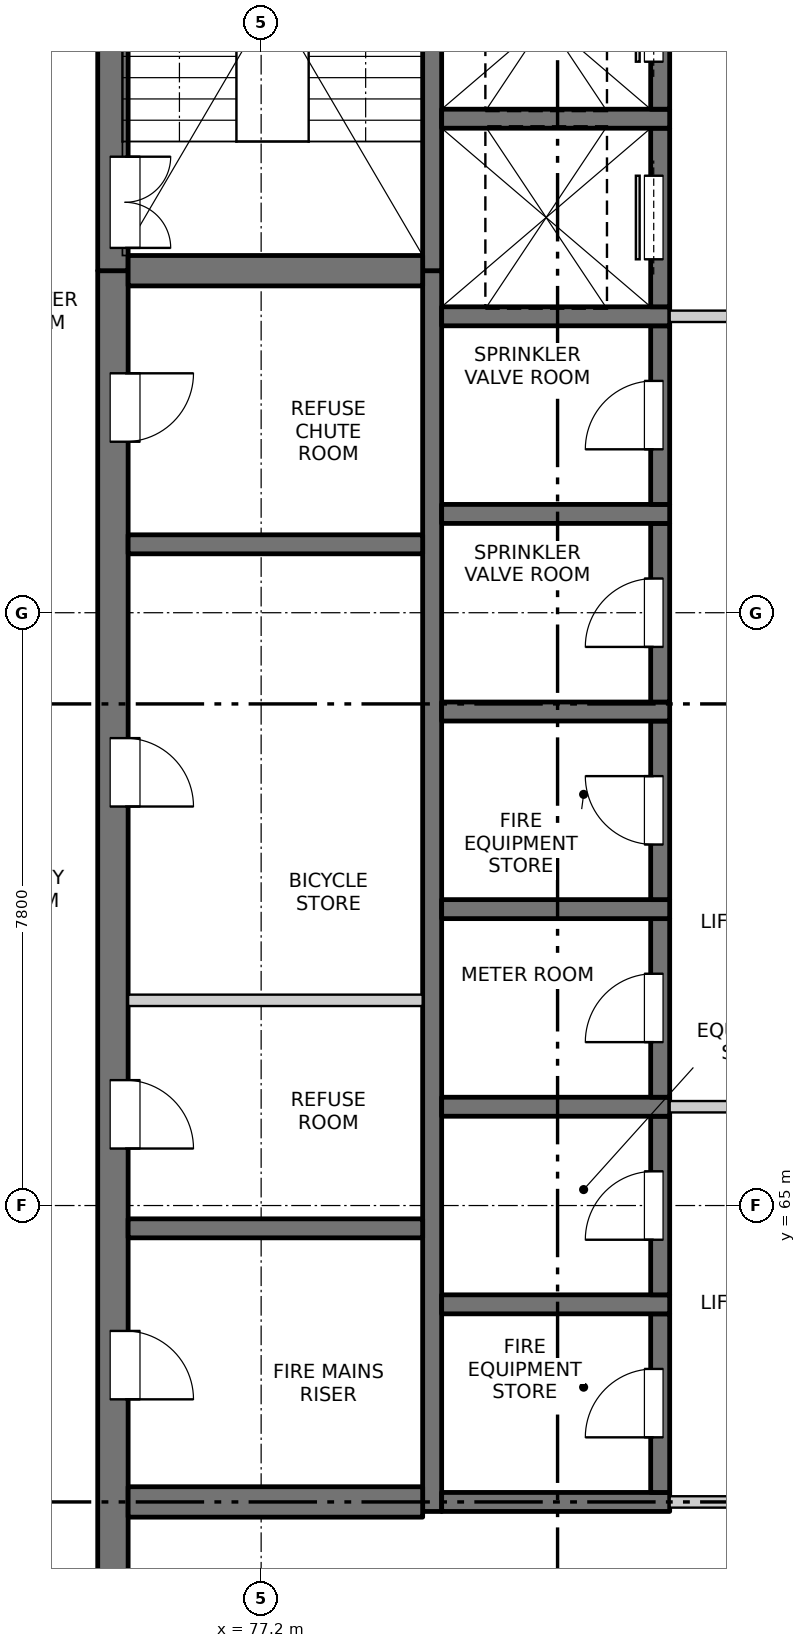
"""IFC4 building model, lengths in metres.
Left out: names, types, materials, properties, quantities, classifications, styles, units other than length and angle.
Written with IfcOpenShell. Run it as: python <this file> out.ifc"""

import sys

from ifc_helpers import new_model, si_unit, direction, frame, frame_2d, origin, place, context, subcontext, project, spatial, rectangle, extrude, element, fill, save


model = new_model("IFC4")
c1 = context("Model", 3, precision=1e-05, world=origin(), true_north=direction((0.0, 1.0)))
c2 = subcontext(c1, "Body", "Model", "MODEL_VIEW")
j1 = project(units=[si_unit("LENGTHUNIT", "METRE"), si_unit("PLANEANGLEUNIT", "RADIAN")], contexts=[c1])
p1 = place(None, origin())
s1 = spatial("IfcSite", under=j1, at=p1, CompositionType="ELEMENT")
p2 = place(p1, origin())
s2 = spatial("IfcBuilding", under=s1, at=p2, CompositionType="ELEMENT")
p3 = place(p2, frame((0.0, 0.0, 259.6)))
s3 = spatial("IfcBuildingStorey", under=s2, at=p3, CompositionType="ELEMENT", Elevation=259.6)
p4 = place(p3, frame((75.25, 55.05, -0.25), z_axis=(0.0, 0.0, 1.0), x_axis=(0.0, 1.0, 0.0)))
e1 = element("IfcWall", 1, at=p4, inside=s3, PredefinedType="SOLIDWALL", context=c2, shape_type="SweptSolid", body=[
    extrude(rectangle(XDim=22.25, YDim=0.4, at=frame_2d((11.125, 0.0))), origin(), (0.0, 0.0, 1.0), 3.4),
])
p5 = place(p4, frame((7.4, 0.0, 0.25)))
e2 = element("IfcOpeningElement", 2, at=p5, cuts=e1, PredefinedType="OPENING", context=c2, shape_type="SweptSolid", body=[
    extrude(rectangle(XDim=0.9, YDim=2.1, at=frame_2d((0.45, 1.05))), frame((0.0, 0.21, 0.0), z_axis=(0.0, -1.0, 0.0), x_axis=(1.0, 0.0, 0.0)), (0.0, 0.0, 1.0), 0.42),
])
p6 = place(p4, frame((10.7, 0.0, 0.25)))
e3 = element("IfcOpeningElement", 3, at=p6, cuts=e1, PredefinedType="OPENING", context=c2, shape_type="SweptSolid", body=[
    extrude(rectangle(XDim=0.9, YDim=2.1, at=frame_2d((0.45, 1.05))), frame((0.0, 0.21, 0.0), z_axis=(0.0, -1.0, 0.0), x_axis=(1.0, 0.0, 0.0)), (0.0, 0.0, 1.0), 0.42),
])
p7 = place(p4, frame((15.2, 0.0, 0.25)))
e4 = element("IfcOpeningElement", 4, at=p7, cuts=e1, PredefinedType="OPENING", context=c2, shape_type="SweptSolid", body=[
    extrude(rectangle(XDim=0.9, YDim=2.1, at=frame_2d((0.45, 1.05))), frame((0.0, 0.21, 0.0), z_axis=(0.0, -1.0, 0.0), x_axis=(1.0, 0.0, 0.0)), (0.0, 0.0, 1.0), 0.42),
])
p8 = place(p4, frame((20.0, 0.0, 0.25)))
e5 = element("IfcOpeningElement", 5, at=p8, cuts=e1, PredefinedType="OPENING", context=c2, shape_type="SweptSolid", body=[
    extrude(rectangle(XDim=0.9, YDim=2.1, at=frame_2d((0.45, 1.05))), frame((0.0, 0.21, 0.0), z_axis=(0.0, -1.0, 0.0), x_axis=(1.0, 0.0, 0.0)), (0.0, 0.0, 1.0), 0.42),
])
p9 = place(p3, frame((75.25, 77.3, -0.25), z_axis=(0.0, 0.0, 1.0), x_axis=(0.0, 1.0, 0.0)))
e6 = element("IfcWall", 6, at=p9, inside=s3, PredefinedType="SOLIDWALL", context=c2, shape_type="SweptSolid", body=[
    extrude(rectangle(XDim=7.4, YDim=0.4, at=frame_2d((3.7, 0.0))), origin(), (0.0, 0.0, 1.0), 3.4),
])
p10 = place(p9, frame((0.3, 0.0, 0.25)))
e7 = element("IfcOpeningElement", 7, at=p10, cuts=e6, PredefinedType="OPENING", context=c2, shape_type="SweptSolid", body=[
    extrude(rectangle(XDim=1.2, YDim=2.1, at=frame_2d((0.6, 1.05))), frame((0.0, 0.21, 0.0), z_axis=(0.0, -1.0, 0.0), x_axis=(1.0, 0.0, 0.0)), (0.0, 0.0, 1.0), 0.42),
])
p11 = place(p3, frame((79.45, 60.975, -0.25), z_axis=(0.0, 0.0, 1.0), x_axis=(0.0, 1.0, 0.0)))
e8 = element("IfcWall", 8, at=p11, inside=s3, PredefinedType="SOLIDWALL", context=c2, shape_type="SweptSolid", body=[
    extrude(rectangle(XDim=16.325, YDim=0.25, at=frame_2d((8.163, 0.0))), origin(), (0.0, 0.0, 1.0), 3.4),
])
p12 = place(p3, frame((79.45, 77.3, -0.25), z_axis=(0.0, 0.0, 1.0), x_axis=(0.0, 1.0, 0.0)))
e9 = element("IfcWall", 9, at=p12, inside=s3, PredefinedType="SOLIDWALL", context=c2, shape_type="SweptSolid", body=[
    extrude(rectangle(XDim=7.0, YDim=0.25, at=frame_2d((3.5, 0.0))), origin(), (0.0, 0.0, 1.0), 3.4),
])
p13 = place(p3, frame((79.575, 61.1, -0.25), z_axis=(0.0, 0.0, 1.0), x_axis=(1.0, 0.0, 0.0)))
e10 = element("IfcWall", 10, at=p13, inside=s3, PredefinedType="SOLIDWALL", context=c2, shape_type="SweptSolid", body=[
    extrude(rectangle(XDim=3.0, YDim=0.25, at=frame_2d((1.5, 0.0))), origin(), (0.0, 0.0, 1.0), 3.4),
])
p14 = place(p3, frame((82.45, 61.225, -0.25), z_axis=(0.0, 0.0, 1.0), x_axis=(0.0, 1.0, 0.0)))
e11 = element("IfcWall", 11, at=p14, inside=s3, PredefinedType="SOLIDWALL", context=c2, shape_type="SweptSolid", body=[
    extrude(rectangle(XDim=2.35, YDim=0.25, at=frame_2d((1.175, 0.0))), origin(), (0.0, 0.0, 1.0), 3.4),
])
p15 = place(p14, frame((0.725, 0.0, 0.25)))
e12 = element("IfcOpeningElement", 12, at=p15, cuts=e11, PredefinedType="OPENING", context=c2, shape_type="SweptSolid", body=[
    extrude(rectangle(XDim=0.9, YDim=2.1, at=frame_2d((0.45, 1.05))), frame((0.0, 0.135, 0.0), z_axis=(0.0, -1.0, 0.0), x_axis=(1.0, 0.0, 0.0)), (0.0, 0.0, 1.0), 0.27),
])
p16 = place(p3, frame((79.575, 63.7, -0.25), z_axis=(0.0, 0.0, 1.0), x_axis=(1.0, 0.0, 0.0)))
e13 = element("IfcWall", 13, at=p16, inside=s3, PredefinedType="SOLIDWALL", context=c2, shape_type="SweptSolid", body=[
    extrude(rectangle(XDim=3.0, YDim=0.25, at=frame_2d((1.5, 0.0))), origin(), (0.0, 0.0, 1.0), 3.4),
])
p17 = place(p3, frame((82.45, 63.825, -0.25), z_axis=(0.0, 0.0, 1.0), x_axis=(0.0, 1.0, 0.0)))
e14 = element("IfcWall", 14, at=p17, inside=s3, PredefinedType="SOLIDWALL", context=c2, shape_type="SweptSolid", body=[
    extrude(rectangle(XDim=2.35, YDim=0.25, at=frame_2d((1.175, 0.0))), origin(), (0.0, 0.0, 1.0), 3.4),
])
p18 = place(p17, frame((0.725, 0.0, 0.25)))
e15 = element("IfcOpeningElement", 15, at=p18, cuts=e14, PredefinedType="OPENING", context=c2, shape_type="SweptSolid", body=[
    extrude(rectangle(XDim=0.9, YDim=2.1, at=frame_2d((0.45, 1.05))), frame((0.0, 0.135, 0.0), z_axis=(0.0, -1.0, 0.0), x_axis=(1.0, 0.0, 0.0)), (0.0, 0.0, 1.0), 0.27),
])
p19 = place(p3, frame((79.575, 66.3, -0.25), z_axis=(0.0, 0.0, 1.0), x_axis=(1.0, 0.0, 0.0)))
e16 = element("IfcWall", 16, at=p19, inside=s3, PredefinedType="SOLIDWALL", context=c2, shape_type="SweptSolid", body=[
    extrude(rectangle(XDim=3.0, YDim=0.25, at=frame_2d((1.5, 0.0))), origin(), (0.0, 0.0, 1.0), 3.4),
])
p20 = place(p3, frame((82.45, 66.425, -0.25), z_axis=(0.0, 0.0, 1.0), x_axis=(0.0, 1.0, 0.0)))
e17 = element("IfcWall", 17, at=p20, inside=s3, PredefinedType="SOLIDWALL", context=c2, shape_type="SweptSolid", body=[
    extrude(rectangle(XDim=2.35, YDim=0.25, at=frame_2d((1.175, 0.0))), origin(), (0.0, 0.0, 1.0), 3.4),
])
p21 = place(p20, frame((0.725, 0.0, 0.25)))
e18 = element("IfcOpeningElement", 18, at=p21, cuts=e17, PredefinedType="OPENING", context=c2, shape_type="SweptSolid", body=[
    extrude(rectangle(XDim=0.9, YDim=2.1, at=frame_2d((0.45, 1.05))), frame((0.0, 0.135, 0.0), z_axis=(0.0, -1.0, 0.0), x_axis=(1.0, 0.0, 0.0)), (0.0, 0.0, 1.0), 0.27),
])
p22 = place(p3, frame((79.575, 68.9, -0.25), z_axis=(0.0, 0.0, 1.0), x_axis=(1.0, 0.0, 0.0)))
e19 = element("IfcWall", 19, at=p22, inside=s3, PredefinedType="SOLIDWALL", context=c2, shape_type="SweptSolid", body=[
    extrude(rectangle(XDim=3.0, YDim=0.25, at=frame_2d((1.5, 0.0))), origin(), (0.0, 0.0, 1.0), 3.4),
])
p23 = place(p3, frame((82.45, 69.025, -0.25), z_axis=(0.0, 0.0, 1.0), x_axis=(0.0, 1.0, 0.0)))
e20 = element("IfcWall", 20, at=p23, inside=s3, PredefinedType="SOLIDWALL", context=c2, shape_type="SweptSolid", body=[
    extrude(rectangle(XDim=2.35, YDim=0.25, at=frame_2d((1.175, 0.0))), origin(), (0.0, 0.0, 1.0), 3.4),
])
p24 = place(p23, frame((0.725, 0.0, 0.25)))
e21 = element("IfcOpeningElement", 21, at=p24, cuts=e20, PredefinedType="OPENING", context=c2, shape_type="SweptSolid", body=[
    extrude(rectangle(XDim=0.9, YDim=2.1, at=frame_2d((0.45, 1.05))), frame((0.0, 0.135, 0.0), z_axis=(0.0, -1.0, 0.0), x_axis=(1.0, 0.0, 0.0)), (0.0, 0.0, 1.0), 0.27),
])
p25 = place(p3, frame((79.575, 71.5, -0.25), z_axis=(0.0, 0.0, 1.0), x_axis=(1.0, 0.0, 0.0)))
e22 = element("IfcWall", 22, at=p25, inside=s3, PredefinedType="SOLIDWALL", context=c2, shape_type="SweptSolid", body=[
    extrude(rectangle(XDim=3.0, YDim=0.25, at=frame_2d((1.5, 0.0))), origin(), (0.0, 0.0, 1.0), 3.4),
])
p26 = place(p3, frame((82.45, 71.625, -0.25), z_axis=(0.0, 0.0, 1.0), x_axis=(0.0, 1.0, 0.0)))
e23 = element("IfcWall", 23, at=p26, inside=s3, PredefinedType="SOLIDWALL", context=c2, shape_type="SweptSolid", body=[
    extrude(rectangle(XDim=2.35, YDim=0.25, at=frame_2d((1.175, 0.0))), origin(), (0.0, 0.0, 1.0), 3.4),
])
p27 = place(p26, frame((0.725, 0.0, 0.25)))
e24 = element("IfcOpeningElement", 24, at=p27, cuts=e23, PredefinedType="OPENING", context=c2, shape_type="SweptSolid", body=[
    extrude(rectangle(XDim=0.9, YDim=2.1, at=frame_2d((0.45, 1.05))), frame((0.0, 0.135, 0.0), z_axis=(0.0, -1.0, 0.0), x_axis=(1.0, 0.0, 0.0)), (0.0, 0.0, 1.0), 0.27),
])
p28 = place(p3, frame((79.575, 74.1, -0.25), z_axis=(0.0, 0.0, 1.0), x_axis=(1.0, 0.0, 0.0)))
e25 = element("IfcWall", 25, at=p28, inside=s3, PredefinedType="SOLIDWALL", context=c2, shape_type="SweptSolid", body=[
    extrude(rectangle(XDim=3.0, YDim=0.25, at=frame_2d((1.5, 0.0))), origin(), (0.0, 0.0, 1.0), 3.4),
])
p29 = place(p3, frame((82.45, 74.225, -0.25), z_axis=(0.0, 0.0, 1.0), x_axis=(0.0, 1.0, 0.0)))
e26 = element("IfcWall", 26, at=p29, inside=s3, PredefinedType="SOLIDWALL", context=c2, shape_type="SweptSolid", body=[
    extrude(rectangle(XDim=2.35, YDim=0.25, at=frame_2d((1.175, 0.0))), origin(), (0.0, 0.0, 1.0), 3.4),
])
p30 = place(p29, frame((0.725, 0.0, 0.25)))
e27 = element("IfcOpeningElement", 27, at=p30, cuts=e26, PredefinedType="OPENING", context=c2, shape_type="SweptSolid", body=[
    extrude(rectangle(XDim=0.9, YDim=2.1, at=frame_2d((0.45, 1.05))), frame((0.0, 0.135, 0.0), z_axis=(0.0, -1.0, 0.0), x_axis=(1.0, 0.0, 0.0)), (0.0, 0.0, 1.0), 0.27),
])
p31 = place(p3, frame((79.575, 76.7, -0.25), z_axis=(0.0, 0.0, 1.0), x_axis=(1.0, 0.0, 0.0)))
e28 = element("IfcWall", 28, at=p31, inside=s3, PredefinedType="SOLIDWALL", context=c2, shape_type="SweptSolid", body=[
    extrude(rectangle(XDim=3.0, YDim=0.25, at=frame_2d((1.5, 0.0))), origin(), (0.0, 0.0, 1.0), 3.4),
])
p32 = place(p3, frame((82.45, 76.825, -0.25), z_axis=(0.0, 0.0, 1.0), x_axis=(0.0, 1.0, 0.0)))
e29 = element("IfcWall", 29, at=p32, inside=s3, PredefinedType="SOLIDWALL", context=c2, shape_type="SweptSolid", body=[
    extrude(rectangle(XDim=2.35, YDim=0.25, at=frame_2d((1.175, 0.0))), origin(), (0.0, 0.0, 1.0), 3.4),
])
p33 = place(p32, frame((0.625, 0.0, 0.25)))
e30 = element("IfcOpeningElement", 30, at=p33, cuts=e29, PredefinedType="OPENING", context=c2, shape_type="SweptSolid", body=[
    extrude(rectangle(XDim=1.1, YDim=2.1, at=frame_2d((0.55, 1.05))), frame((0.0, 0.135, 0.0), z_axis=(0.0, -1.0, 0.0), x_axis=(1.0, 0.0, 0.0)), (0.0, 0.0, 1.0), 0.27),
])
p34 = place(p3, frame((79.575, 79.3, -0.25), z_axis=(0.0, 0.0, 1.0), x_axis=(1.0, 0.0, 0.0)))
e31 = element("IfcWall", 31, at=p34, inside=s3, PredefinedType="SOLIDWALL", context=c2, shape_type="SweptSolid", body=[
    extrude(rectangle(XDim=3.0, YDim=0.25, at=frame_2d((1.5, 0.0))), origin(), (0.0, 0.0, 1.0), 3.4),
])
p35 = place(p3, frame((82.45, 79.425, -0.25), z_axis=(0.0, 0.0, 1.0), x_axis=(0.0, 1.0, 0.0)))
e32 = element("IfcWall", 32, at=p35, inside=s3, PredefinedType="SOLIDWALL", context=c2, shape_type="SweptSolid", body=[
    extrude(rectangle(XDim=2.35, YDim=0.25, at=frame_2d((1.175, 0.0))), origin(), (0.0, 0.0, 1.0), 3.4),
])
p36 = place(p35, frame((0.625, 0.0, 0.25)))
e33 = element("IfcOpeningElement", 33, at=p36, cuts=e32, PredefinedType="OPENING", context=c2, shape_type="SweptSolid", body=[
    extrude(rectangle(XDim=1.1, YDim=2.1, at=frame_2d((0.55, 1.05))), frame((0.0, 0.135, 0.0), z_axis=(0.0, -1.0, 0.0), x_axis=(1.0, 0.0, 0.0)), (0.0, 0.0, 1.0), 0.27),
])
p37 = place(p3, frame((75.45, 61.1, -0.25), z_axis=(0.0, 0.0, 1.0), x_axis=(1.0, 0.0, 0.0)))
e34 = element("IfcWall", 34, at=p37, inside=s3, PredefinedType="SOLIDWALL", context=c2, shape_type="SweptSolid", body=[
    extrude(rectangle(XDim=3.875, YDim=0.4, at=frame_2d((1.938, 0.0))), origin(), (0.0, 0.0, 1.0), 3.4),
])
for number, where, z_axis, x_axis in (
    (35, (75.45, 64.7, -0.25), (0.0, 0.0, 1.0), (1.0, 0.0, 0.0)),
    (36, (75.45, 73.7, -0.25), (0.0, 0.0, 1.0), (1.0, 0.0, 0.0)),
):
    element("IfcWall", number, at=place(p3, frame(where, z_axis=z_axis, x_axis=x_axis)), inside=s3, PredefinedType="SOLIDWALL", context=c2, shape_type="SweptSolid", body=[
        extrude(rectangle(XDim=3.875, YDim=0.25, at=frame_2d((1.938, 0.0))), origin(), (0.0, 0.0, 1.0), 3.4),
    ])
p38 = place(p3, frame((75.45, 77.3, -0.25), z_axis=(0.0, 0.0, 1.0), x_axis=(1.0, 0.0, 0.0)))
e37 = element("IfcWall", 37, at=p38, inside=s3, PredefinedType="SOLIDWALL", context=c2, shape_type="SweptSolid", body=[
    extrude(rectangle(XDim=3.875, YDim=0.4, at=frame_2d((1.938, 0.0))), origin(), (0.0, 0.0, 1.0), 3.4),
])
p39 = place(p3, frame((82.575, 61.1, 0.0), z_axis=(0.0, 0.0, 1.0), x_axis=(1.0, 0.0, 0.0)))
e38 = element("IfcWall", 38, at=p39, inside=s3, PredefinedType="PARTITIONING", context=c2, shape_type="SweptSolid", body=[
    extrude(rectangle(XDim=4.85, YDim=0.15, at=frame_2d((2.425, 0.0))), origin(), (0.0, 0.0, 1.0), 3.15),
])
p40 = place(p39, frame((1.525, 0.0, 0.0)))
e39 = element("IfcOpeningElement", 39, at=p40, cuts=e38, PredefinedType="OPENING", context=c2, shape_type="SweptSolid", body=[
    extrude(rectangle(XDim=1.8, YDim=2.1, at=frame_2d((0.9, 1.05))), frame((0.0, 0.085, 0.0), z_axis=(0.0, -1.0, 0.0), x_axis=(1.0, 0.0, 0.0)), (0.0, 0.0, 1.0), 0.17),
])
p41 = place(p3, frame((82.575, 66.3, 0.0), z_axis=(0.0, 0.0, 1.0), x_axis=(1.0, 0.0, 0.0)))
e40 = element("IfcWall", 40, at=p41, inside=s3, PredefinedType="PARTITIONING", context=c2, shape_type="SweptSolid", body=[
    extrude(rectangle(XDim=4.85, YDim=0.15, at=frame_2d((2.425, 0.0))), origin(), (0.0, 0.0, 1.0), 3.15),
])
p42 = place(p41, frame((1.525, 0.0, 0.0)))
e41 = element("IfcOpeningElement", 41, at=p42, cuts=e40, PredefinedType="OPENING", context=c2, shape_type="SweptSolid", body=[
    extrude(rectangle(XDim=1.8, YDim=2.1, at=frame_2d((0.9, 1.05))), frame((0.0, 0.085, 0.0), z_axis=(0.0, -1.0, 0.0), x_axis=(1.0, 0.0, 0.0)), (0.0, 0.0, 1.0), 0.17),
])
p43 = place(p3, frame((75.45, 67.7, 0.0), z_axis=(0.0, 0.0, 1.0), x_axis=(1.0, 0.0, 0.0)))
e42 = element("IfcWall", 42, at=p43, inside=s3, PredefinedType="PARTITIONING", context=c2, shape_type="SweptSolid", body=[
    extrude(rectangle(XDim=3.875, YDim=0.15, at=frame_2d((1.938, 0.0))), origin(), (0.0, 0.0, 1.0), 3.15),
])
p44 = place(p3, frame((82.575, 76.7, 0.0), z_axis=(0.0, 0.0, 1.0), x_axis=(1.0, 0.0, 0.0)))
e43 = element("IfcWall", 43, at=p44, inside=s3, PredefinedType="PARTITIONING", context=c2, shape_type="SweptSolid", body=[
    extrude(rectangle(XDim=4.85, YDim=0.15, at=frame_2d((2.425, 0.0))), origin(), (0.0, 0.0, 1.0), 3.15),
])
p45 = place(p44, frame((1.525, 0.0, 0.0)))
e44 = element("IfcOpeningElement", 44, at=p45, cuts=e43, PredefinedType="OPENING", context=c2, shape_type="SweptSolid", body=[
    extrude(rectangle(XDim=1.8, YDim=2.1, at=frame_2d((0.9, 1.05))), frame((0.0, 0.085, 0.0), z_axis=(0.0, -1.0, 0.0), x_axis=(1.0, 0.0, 0.0)), (0.0, 0.0, 1.0), 0.17),
])
p46 = place(p15, origin())
e45 = element("IfcDoor", 45, at=p46, inside=s3, OperationType="SINGLE_SWING_LEFT", PredefinedType="DOOR", context=c2, shape_type="SweptSolid", body=[
    extrude(rectangle(XDim=0.9, YDim=2.1, at=frame_2d((0.45, 1.05))), frame((0.0, 0.11, 0.0), z_axis=(0.0, -1.0, 0.0), x_axis=(1.0, 0.0, 0.0)), (0.0, 0.0, 1.0), 0.05),
])
fill(e12, e45)
p47 = place(p5, origin())
e46 = element("IfcDoor", 46, at=p47, inside=s3, OperationType="SINGLE_SWING_RIGHT", PredefinedType="DOOR", context=c2, shape_type="SweptSolid", body=[
    extrude(rectangle(XDim=0.9, YDim=2.1, at=frame_2d((0.45, 1.05))), frame((0.0, -0.135, 0.0), z_axis=(0.0, -1.0, 0.0), x_axis=(1.0, 0.0, 0.0)), (0.0, 0.0, 1.0), 0.05),
])
fill(e2, e46)
p48 = place(p18, origin())
e47 = element("IfcDoor", 47, at=p48, inside=s3, OperationType="SINGLE_SWING_LEFT", PredefinedType="DOOR", context=c2, shape_type="SweptSolid", body=[
    extrude(rectangle(XDim=0.9, YDim=2.1, at=frame_2d((0.45, 1.05))), frame((0.0, 0.11, 0.0), z_axis=(0.0, -1.0, 0.0), x_axis=(1.0, 0.0, 0.0)), (0.0, 0.0, 1.0), 0.05),
])
fill(e15, e47)
p49 = place(p6, origin())
e48 = element("IfcDoor", 48, at=p49, inside=s3, OperationType="SINGLE_SWING_RIGHT", PredefinedType="DOOR", context=c2, shape_type="SweptSolid", body=[
    extrude(rectangle(XDim=0.9, YDim=2.1, at=frame_2d((0.45, 1.05))), frame((0.0, -0.135, 0.0), z_axis=(0.0, -1.0, 0.0), x_axis=(1.0, 0.0, 0.0)), (0.0, 0.0, 1.0), 0.05),
])
fill(e3, e48)
p50 = place(p21, origin())
e49 = element("IfcDoor", 49, at=p50, inside=s3, OperationType="SINGLE_SWING_LEFT", PredefinedType="DOOR", context=c2, shape_type="SweptSolid", body=[
    extrude(rectangle(XDim=0.9, YDim=2.1, at=frame_2d((0.45, 1.05))), frame((0.0, 0.11, 0.0), z_axis=(0.0, -1.0, 0.0), x_axis=(1.0, 0.0, 0.0)), (0.0, 0.0, 1.0), 0.05),
])
fill(e18, e49)
p51 = place(p24, origin())
e50 = element("IfcDoor", 50, at=p51, inside=s3, OperationType="SINGLE_SWING_RIGHT", PredefinedType="DOOR", context=c2, shape_type="SweptSolid", body=[
    extrude(rectangle(XDim=0.9, YDim=2.1, at=frame_2d((0.45, 1.05))), frame((0.0, 0.11, 0.0), z_axis=(0.0, -1.0, 0.0), x_axis=(1.0, 0.0, 0.0)), (0.0, 0.0, 1.0), 0.05),
])
fill(e21, e50)
p52 = place(p7, origin())
e51 = element("IfcDoor", 51, at=p52, inside=s3, OperationType="SINGLE_SWING_RIGHT", PredefinedType="DOOR", context=c2, shape_type="SweptSolid", body=[
    extrude(rectangle(XDim=0.9, YDim=2.1, at=frame_2d((0.45, 1.05))), frame((0.0, -0.135, 0.0), z_axis=(0.0, -1.0, 0.0), x_axis=(1.0, 0.0, 0.0)), (0.0, 0.0, 1.0), 0.05),
])
fill(e4, e51)
p53 = place(p27, origin())
e52 = element("IfcDoor", 52, at=p53, inside=s3, OperationType="SINGLE_SWING_LEFT", PredefinedType="DOOR", context=c2, shape_type="SweptSolid", body=[
    extrude(rectangle(XDim=0.9, YDim=2.1, at=frame_2d((0.45, 1.05))), frame((0.0, 0.11, 0.0), z_axis=(0.0, -1.0, 0.0), x_axis=(1.0, 0.0, 0.0)), (0.0, 0.0, 1.0), 0.05),
])
fill(e24, e52)
p54 = place(p30, origin())
e53 = element("IfcDoor", 53, at=p54, inside=s3, OperationType="SINGLE_SWING_LEFT", PredefinedType="DOOR", context=c2, shape_type="SweptSolid", body=[
    extrude(rectangle(XDim=0.9, YDim=2.1, at=frame_2d((0.45, 1.05))), frame((0.0, 0.11, 0.0), z_axis=(0.0, -1.0, 0.0), x_axis=(1.0, 0.0, 0.0)), (0.0, 0.0, 1.0), 0.05),
])
fill(e27, e53)
p55 = place(p8, origin())
e54 = element("IfcDoor", 54, at=p55, inside=s3, OperationType="SINGLE_SWING_LEFT", PredefinedType="DOOR", context=c2, shape_type="SweptSolid", body=[
    extrude(rectangle(XDim=0.9, YDim=2.1, at=frame_2d((0.45, 1.05))), frame((0.0, -0.135, 0.0), z_axis=(0.0, -1.0, 0.0), x_axis=(1.0, 0.0, 0.0)), (0.0, 0.0, 1.0), 0.05),
])
fill(e5, e54)
p56 = place(p33, origin())
e55 = element("IfcDoor", 55, at=p56, inside=s3, OperationType="SLIDING_TO_LEFT", PredefinedType="DOOR", context=c2, shape_type="SweptSolid", body=[
    extrude(rectangle(XDim=1.1, YDim=2.1, at=frame_2d((0.55, 1.05))), frame((0.0, 0.11, 0.0), z_axis=(0.0, -1.0, 0.0), x_axis=(1.0, 0.0, 0.0)), (0.0, 0.0, 1.0), 0.05),
])
fill(e30, e55)
p57 = place(p10, origin())
e56 = element("IfcDoor", 56, at=p57, inside=s3, OperationType="DOUBLE_DOOR_SINGLE_SWING", PredefinedType="DOOR", context=c2, shape_type="SweptSolid", body=[
    extrude(rectangle(XDim=1.2, YDim=2.1, at=frame_2d((0.6, 1.05))), frame((0.0, -0.135, 0.0), z_axis=(0.0, -1.0, 0.0), x_axis=(1.0, 0.0, 0.0)), (0.0, 0.0, 1.0), 0.05),
])
fill(e7, e56)
p58 = place(p36, origin())
e57 = element("IfcDoor", 57, at=p58, inside=s3, OperationType="SLIDING_TO_LEFT", PredefinedType="DOOR", context=c2, shape_type="SweptSolid", body=[
    extrude(rectangle(XDim=1.1, YDim=2.1, at=frame_2d((0.55, 1.05))), frame((0.0, 0.11, 0.0), z_axis=(0.0, -1.0, 0.0), x_axis=(1.0, 0.0, 0.0)), (0.0, 0.0, 1.0), 0.05),
])
fill(e33, e57)
save(model, sys.argv[1])
